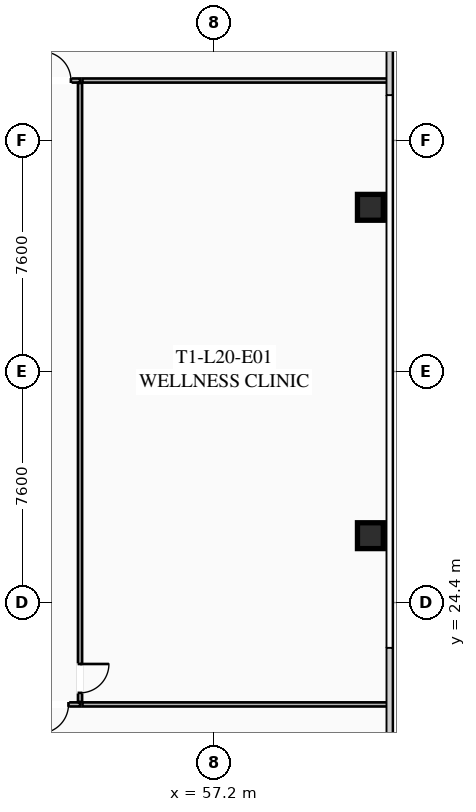
"""IFC4 building model, lengths in metres.
Left out: names, types, materials, properties, quantities, classifications, styles, units other than length and angle.
Written with IfcOpenShell. Run it as: python <this file> out.ifc"""

import sys

from ifc_helpers import new_model, si_unit, direction, frame, frame_2d, origin, origin_2d, place, context, subcontext, project, spatial, rectangle, hollow_rectangle, extrude, element, fill, save


model = new_model("IFC4")
c1 = context("Model", 3, precision=1e-05, world=origin(), true_north=direction((0.0, 1.0)))
c2 = subcontext(c1, "Body", "Model", "MODEL_VIEW")
j1 = project(units=[si_unit("LENGTHUNIT", "METRE"), si_unit("PLANEANGLEUNIT", "RADIAN")], contexts=[c1])
p1 = place(None, origin())
s1 = spatial("IfcSite", under=j1, at=p1, CompositionType="ELEMENT")
p2 = place(p1, origin())
s2 = spatial("IfcBuilding", under=s1, at=p2, CompositionType="ELEMENT")
p3 = place(p2, frame((0.0, 0.0, 77.85)))
s3 = spatial("IfcBuildingStorey", under=s2, at=p3, CompositionType="ELEMENT", Elevation=77.85)
for number, where, z_axis, x_axis in (
    (1, (62.35, 26.6, 0.0), (0.0, 0.0, 1.0), (1.0, 0.0, 0.0)),
    (2, (62.35, 37.4, 0.0), (0.0, 0.0, 1.0), (1.0, 0.0, 0.0)),
):
    element("IfcColumn", number, at=place(p3, frame(where, z_axis=z_axis, x_axis=x_axis)), inside=s3, PredefinedType="COLUMN", context=c2, shape_type="SweptSolid", body=[
        extrude(hollow_rectangle(XDim=0.85, YDim=0.85, WallThickness=0.035, at=origin_2d()), origin(), (0.0, 0.0, 1.0), 3.35),
    ])
p4 = place(p3, frame((24.05, 41.57, 0.0), z_axis=(0.0, 0.0, 1.0), x_axis=(1.0, 0.0, 0.0)))
e3 = element("IfcWall", 3, at=p4, inside=s3, PredefinedType="PARTITIONING", context=c2, shape_type="SweptSolid", body=[
    extrude(rectangle(XDim=28.75, YDim=0.135, at=frame_2d((14.375, 0.0))), origin(), (0.0, 0.0, 1.0), 2.703),
])
p5 = place(p4, frame((0.3, 0.0, 0.0)))
e4 = element("IfcOpeningElement", 4, at=p5, cuts=e3, PredefinedType="OPENING", context=c2, shape_type="SweptSolid", body=[
    extrude(rectangle(XDim=0.95, YDim=2.05, at=frame_2d((0.475, 1.025))), frame((0.0, 0.077, 0.0), z_axis=(0.0, -1.0, 0.0), x_axis=(1.0, 0.0, 0.0)), (0.0, 0.0, 1.0), 0.155),
])
p6 = place(p4, frame((17.793, 0.0, 0.0)))
e5 = element("IfcOpeningElement", 5, at=p6, cuts=e3, PredefinedType="OPENING", context=c2, shape_type="SweptSolid", body=[
    extrude(rectangle(XDim=0.95, YDim=2.05, at=frame_2d((0.475, 1.025))), frame((0.0, 0.077, 0.0), z_axis=(0.0, -1.0, 0.0), x_axis=(1.0, 0.0, 0.0)), (0.0, 0.0, 1.0), 0.155),
])
p7 = place(p4, frame((27.5, 0.0, 0.0)))
e6 = element("IfcOpeningElement", 6, at=p7, cuts=e3, PredefinedType="OPENING", context=c2, shape_type="SweptSolid", body=[
    extrude(rectangle(XDim=0.95, YDim=2.05, at=frame_2d((0.475, 1.025))), frame((0.0, 0.077, 0.0), z_axis=(0.0, -1.0, 0.0), x_axis=(1.0, 0.0, 0.0)), (0.0, 0.0, 1.0), 0.155),
])
p8 = place(p3, frame((52.8, 21.05, 0.0), z_axis=(0.0, 0.0, 1.0), x_axis=(-1.0, 0.0, 0.0)))
e7 = element("IfcWall", 7, at=p8, inside=s3, PredefinedType="PARTITIONING", context=c2, shape_type="SweptSolid", body=[
    extrude(rectangle(XDim=28.75, YDim=0.135, at=frame_2d((14.375, 0.0))), origin(), (0.0, 0.0, 1.0), 2.703),
])
p9 = place(p8, frame((27.42, 0.0, 0.0)))
e8 = element("IfcOpeningElement", 8, at=p9, cuts=e7, PredefinedType="OPENING", context=c2, shape_type="SweptSolid", body=[
    extrude(rectangle(XDim=0.95, YDim=2.05, at=frame_2d((0.475, 1.025))), frame((0.0, 0.077, 0.0), z_axis=(0.0, -1.0, 0.0), x_axis=(1.0, 0.0, 0.0)), (0.0, 0.0, 1.0), 0.155),
])
p10 = place(p8, frame((14.064, 0.0, 0.0)))
e9 = element("IfcOpeningElement", 9, at=p10, cuts=e7, PredefinedType="OPENING", context=c2, shape_type="SweptSolid", body=[
    extrude(rectangle(XDim=0.95, YDim=2.05, at=frame_2d((0.475, 1.025))), frame((0.0, 0.077, 0.0), z_axis=(0.0, -1.0, 0.0), x_axis=(1.0, 0.0, 0.0)), (0.0, 0.0, 1.0), 0.155),
])
p11 = place(p8, frame((0.38, 0.0, 0.0)))
e10 = element("IfcOpeningElement", 10, at=p11, cuts=e7, PredefinedType="OPENING", context=c2, shape_type="SweptSolid", body=[
    extrude(rectangle(XDim=0.95, YDim=2.05, at=frame_2d((0.475, 1.025))), frame((0.0, 0.077, 0.0), z_axis=(0.0, -1.0, 0.0), x_axis=(1.0, 0.0, 0.0)), (0.0, 0.0, 1.0), 0.155),
])
p12 = place(p3, frame((52.8, 41.49, 0.0), z_axis=(0.0, 0.0, 1.0), x_axis=(0.0, -1.0, 0.0)))
e11 = element("IfcWall", 11, at=p12, inside=s3, PredefinedType="PARTITIONING", context=c2, shape_type="SweptSolid", body=[
    extrude(rectangle(XDim=20.36, YDim=0.135, at=frame_2d((10.18, 0.0))), origin(), (0.0, 0.0, 1.0), 2.703),
])
p13 = place(p12, frame((19.11, 0.0, 0.0)))
e12 = element("IfcOpeningElement", 12, at=p13, cuts=e11, PredefinedType="OPENING", context=c2, shape_type="SweptSolid", body=[
    extrude(rectangle(XDim=0.95, YDim=2.05, at=frame_2d((0.475, 1.025))), frame((0.0, 0.077, 0.0), z_axis=(0.0, -1.0, 0.0), x_axis=(1.0, 0.0, 0.0)), (0.0, 0.0, 1.0), 0.155),
])
for number, where, z_axis, x_axis in (
    (13, (62.98, 41.57, 0.0), (0.0, 0.0, 1.0), (-1.0, 0.0, 0.0)),
    (14, (52.88, 21.05, 0.0), (0.0, 0.0, 1.0), (1.0, 0.0, 0.0)),
):
    element("IfcWall", number, at=place(p3, frame(where, z_axis=z_axis, x_axis=x_axis)), inside=s3, PredefinedType="PARTITIONING", context=c2, shape_type="SweptSolid", body=[
        extrude(rectangle(XDim=10.1, YDim=0.135, at=frame_2d((5.05, 0.0))), origin(), (0.0, 0.0, 1.0), 2.703),
    ])
p14 = place(p7, origin())
e15 = element("IfcDoor", 15, at=p14, inside=s3, OperationType="SINGLE_SWING_LEFT", PredefinedType="DOOR", context=c2, shape_type="SweptSolid", body=[
    extrude(rectangle(XDim=0.95, YDim=2.05, at=frame_2d((0.475, 1.025))), frame((0.0, 0.025, 0.0), z_axis=(0.0, -1.0, 0.0), x_axis=(1.0, 0.0, 0.0)), (0.0, 0.0, 1.0), 0.05),
])
fill(e6, e15)
p15 = place(p11, origin())
e16 = element("IfcDoor", 16, at=p15, inside=s3, OperationType="SINGLE_SWING_RIGHT", PredefinedType="DOOR", context=c2, shape_type="SweptSolid", body=[
    extrude(rectangle(XDim=0.95, YDim=2.05, at=frame_2d((0.475, 1.025))), frame((0.0, 0.025, 0.0), z_axis=(0.0, -1.0, 0.0), x_axis=(1.0, 0.0, 0.0)), (0.0, 0.0, 1.0), 0.05),
])
fill(e10, e16)
p16 = place(p13, origin())
e17 = element("IfcDoor", 17, at=p16, inside=s3, OperationType="SINGLE_SWING_LEFT", PredefinedType="DOOR", context=c2, shape_type="SweptSolid", body=[
    extrude(rectangle(XDim=0.95, YDim=2.05, at=frame_2d((0.475, 1.025))), frame((0.0, 0.025, 0.0), z_axis=(0.0, -1.0, 0.0), x_axis=(1.0, 0.0, 0.0)), (0.0, 0.0, 1.0), 0.05),
])
fill(e12, e17)
save(model, sys.argv[1])
